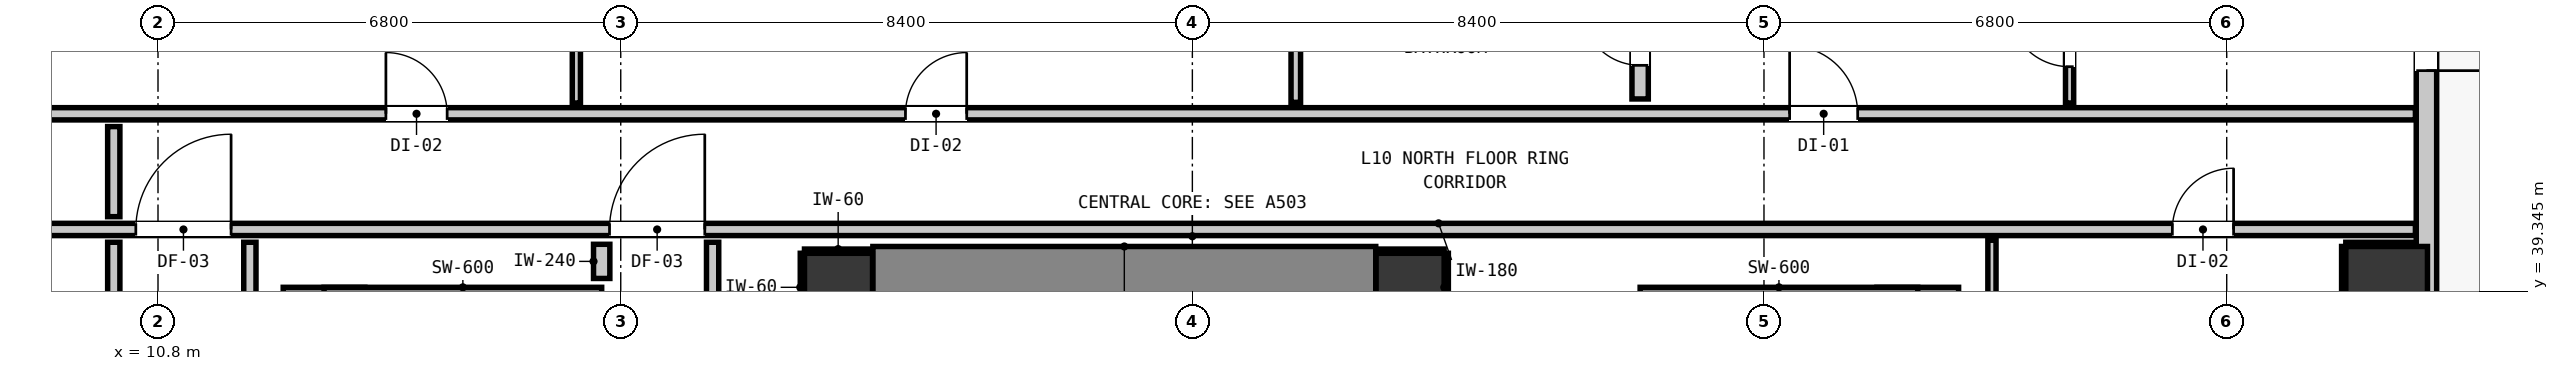
"""IFC4 building model, lengths in metres.
Left out: names, types, materials, properties, quantities, classifications, styles, units other than length and angle.
Written with IfcOpenShell. Run it as: python <this file> out.ifc"""

import sys

from ifc_helpers import new_model, si_unit, direction, frame, frame_2d, origin, origin_2d, place, context, subcontext, project, spatial, rectangle, extrude, element, fill, save


model = new_model("IFC4")
c1 = context("Model", 3, precision=1e-05, world=origin(), true_north=direction((0.0, 1.0)))
c2 = subcontext(c1, "Body", "Model", "MODEL_VIEW")
j1 = project(units=[si_unit("LENGTHUNIT", "METRE"), si_unit("PLANEANGLEUNIT", "RADIAN")], contexts=[c1])
p1 = place(None, origin())
s1 = spatial("IfcSite", under=j1, at=p1, CompositionType="ELEMENT")
p2 = place(p1, origin())
s2 = spatial("IfcBuilding", under=s1, at=p2, CompositionType="ELEMENT")
p3 = place(p2, frame((0.0, 0.0, 38.6)))
s3 = spatial("IfcBuildingStorey", under=s2, at=p3, CompositionType="ELEMENT", Elevation=38.6)
for number, where, z_axis, x_axis in (
    (1, (20.8, 39.4, 0.0), (0.0, 0.0, 1.0), (1.0, 0.0, 0.0)),
    (2, (29.2, 39.4, 0.0), (0.0, 0.0, 1.0), (1.0, 0.0, 0.0)),
):
    element("IfcColumn", number, at=place(p3, frame(where, z_axis=z_axis, x_axis=x_axis)), inside=s3, PredefinedType="COLUMN", context=c2, shape_type="SweptSolid", body=[
        extrude(rectangle(XDim=1.0, YDim=1.0, at=origin_2d()), origin(), (0.0, 0.0, 1.0), 3.32),
    ])
p4 = place(p3, frame((13.24, 31.205, 0.0), z_axis=(0.0, 0.0, 1.0), x_axis=(0.0, 1.0, 0.0)))
e3 = element("IfcWall", 3, at=p4, inside=s3, PredefinedType="SHEAR", context=c2, shape_type="SweptSolid", body=[
    extrude(rectangle(XDim=8.195, YDim=1.2, at=frame_2d((4.097, 0.0))), origin(), (0.0, 0.0, 1.0), 3.32),
])
p5 = place(p3, frame((13.24, 39.1, 0.0), z_axis=(0.0, 0.0, 1.0), x_axis=(1.0, 0.0, 0.0)))
e4 = element("IfcWall", 4, at=p5, inside=s3, PredefinedType="SHEAR", context=c2, shape_type="SweptSolid", body=[
    extrude(rectangle(XDim=4.08, YDim=0.6, at=frame_2d((2.04, 0.0))), origin(), (0.0, 0.0, 1.0), 3.32),
])
p6 = place(p3, frame((36.66, 31.205, 0.0), z_axis=(0.0, 0.0, 1.0), x_axis=(0.0, 1.0, 0.0)))
e5 = element("IfcWall", 5, at=p6, inside=s3, PredefinedType="SHEAR", context=c2, shape_type="SweptSolid", body=[
    extrude(rectangle(XDim=8.195, YDim=1.2, at=frame_2d((4.097, 0.0))), origin(), (0.0, 0.0, 1.0), 3.32),
])
p7 = place(p3, frame((32.58, 39.1, 0.0), z_axis=(0.0, 0.0, 1.0), x_axis=(1.0, 0.0, 0.0)))
e6 = element("IfcWall", 6, at=p7, inside=s3, PredefinedType="SHEAR", context=c2, shape_type="SweptSolid", body=[
    extrude(rectangle(XDim=4.08, YDim=0.6, at=frame_2d((2.04, 0.0))), origin(), (0.0, 0.0, 1.0), 3.32),
])
p8 = place(p3, frame((21.305, 39.4, 0.0), z_axis=(0.0, 0.0, 1.0), x_axis=(1.0, 0.0, 0.0)))
e7 = element("IfcWall", 7, at=p8, inside=s3, PredefinedType="SHEAR", context=c2, shape_type="SweptSolid", body=[
    extrude(rectangle(XDim=7.39, YDim=1.2, at=frame_2d((3.695, 0.0))), origin(), (0.0, 0.0, 1.0), 3.32),
])
p9 = place(p3, frame((43.55, 39.4, 0.0), z_axis=(0.0, 0.0, 1.0), x_axis=(1.0, 0.0, 0.0)))
e8 = element("IfcColumn", 8, at=p9, inside=s3, PredefinedType="COLUMN", context=c2, shape_type="SweptSolid", body=[
    extrude(rectangle(XDim=1.2, YDim=1.2, at=origin_2d()), origin(), (0.0, 0.0, 1.0), 2.9),
])
p10 = place(p3, frame((44.135, 44.835, 0.0), z_axis=(0.0, 0.0, 1.0), x_axis=(0.0, -1.0, 0.0)))
e9 = element("IfcWall", 9, at=p10, inside=s3, PredefinedType="STANDARD", context=c2, shape_type="SweptSolid", body=[
    extrude(rectangle(XDim=34.67, YDim=0.3, at=frame_2d((17.335, 0.0))), origin(), (0.0, 0.0, 1.0), 2.9),
])
p11 = place(p10, frame((1.251, 0.0, 0.0)))
e10 = element("IfcOpeningElement", 10, at=p11, cuts=e9, PredefinedType="OPENING", context=c2, shape_type="SweptSolid", body=[
    extrude(rectangle(XDim=1.0, YDim=2.15, at=frame_2d((0.5, 1.075))), frame((0.0, 0.16, 0.0), z_axis=(0.0, -1.0, 0.0), x_axis=(1.0, 0.0, 0.0)), (0.0, 0.0, 1.0), 0.32),
])
p12 = place(p10, frame((29.508, 0.0, 0.85)))
e11 = element("IfcOpeningElement", 11, at=p12, cuts=e9, PredefinedType="OPENING", context=c2, shape_type="SweptSolid", body=[
    extrude(rectangle(XDim=1.05, YDim=1.65, at=frame_2d((0.525, 0.825))), frame((0.0, 0.16, 0.0), z_axis=(0.0, -1.0, 0.0), x_axis=(1.0, 0.0, 0.0)), (0.0, 0.0, 1.0), 0.32),
])
p13 = place(p10, frame((19.619, 0.0, 0.85)))
e12 = element("IfcOpeningElement", 12, at=p13, cuts=e9, PredefinedType="OPENING", context=c2, shape_type="SweptSolid", body=[
    extrude(rectangle(XDim=1.05, YDim=1.65, at=frame_2d((0.525, 0.825))), frame((0.0, 0.16, 0.0), z_axis=(0.0, -1.0, 0.0), x_axis=(1.0, 0.0, 0.0)), (0.0, 0.0, 1.0), 0.32),
])
p14 = place(p3, frame((1.827, 40.25, 0.0), z_axis=(0.0, 0.0, 1.0), x_axis=(1.0, 0.0, 0.0)))
e13 = element("IfcWall", 13, at=p14, inside=s3, PredefinedType="PARTITIONING", context=c2, shape_type="SweptSolid", body=[
    extrude(rectangle(XDim=42.146, YDim=0.18, at=frame_2d((21.073, 0.0))), origin(), (0.0, 0.0, 1.0), 2.9),
])
p15 = place(p14, frame((15.608, 0.0, 0.0)))
e14 = element("IfcOpeningElement", 14, at=p15, cuts=e13, PredefinedType="OPENING", context=c2, shape_type="SweptSolid", body=[
    extrude(rectangle(XDim=1.4, YDim=2.15, at=frame_2d((0.7, 1.075))), frame((0.0, 0.1, 0.0), z_axis=(0.0, -1.0, 0.0), x_axis=(1.0, 0.0, 0.0)), (0.0, 0.0, 1.0), 0.2),
])
p16 = place(p14, frame((8.647, 0.0, 0.0)))
e15 = element("IfcOpeningElement", 15, at=p16, cuts=e13, PredefinedType="OPENING", context=c2, shape_type="SweptSolid", body=[
    extrude(rectangle(XDim=1.4, YDim=2.15, at=frame_2d((0.7, 1.075))), frame((0.0, 0.1, 0.0), z_axis=(0.0, -1.0, 0.0), x_axis=(1.0, 0.0, 0.0)), (0.0, 0.0, 1.0), 0.2),
])
p17 = place(p14, frame((38.574, 0.0, 0.0)))
e16 = element("IfcOpeningElement", 16, at=p17, cuts=e13, PredefinedType="OPENING", context=c2, shape_type="SweptSolid", body=[
    extrude(rectangle(XDim=0.9, YDim=2.1, at=frame_2d((0.45, 1.05))), frame((0.0, 0.1, 0.0), z_axis=(0.0, -1.0, 0.0), x_axis=(1.0, 0.0, 0.0)), (0.0, 0.0, 1.0), 0.2),
])
p18 = place(p3, frame((1.827, 41.95, 0.0), z_axis=(0.0, 0.0, 1.0), x_axis=(1.0, 0.0, 0.0)))
e17 = element("IfcWall", 17, at=p18, inside=s3, PredefinedType="PARTITIONING", context=c2, shape_type="SweptSolid", body=[
    extrude(rectangle(XDim=42.146, YDim=0.18, at=frame_2d((21.073, 0.0))), origin(), (0.0, 0.0, 1.0), 2.9),
])
p19 = place(p18, frame((12.322, 0.0, 0.0)))
e18 = element("IfcOpeningElement", 18, at=p19, cuts=e17, PredefinedType="OPENING", context=c2, shape_type="SweptSolid", body=[
    extrude(rectangle(XDim=0.9, YDim=2.1, at=frame_2d((0.45, 1.05))), frame((0.0, 0.1, 0.0), z_axis=(0.0, -1.0, 0.0), x_axis=(1.0, 0.0, 0.0)), (0.0, 0.0, 1.0), 0.2),
])
p20 = place(p18, frame((19.957, 0.0, 0.0)))
e19 = element("IfcOpeningElement", 19, at=p20, cuts=e17, PredefinedType="OPENING", context=c2, shape_type="SweptSolid", body=[
    extrude(rectangle(XDim=0.9, YDim=2.1, at=frame_2d((0.45, 1.05))), frame((0.0, 0.1, 0.0), z_axis=(0.0, -1.0, 0.0), x_axis=(1.0, 0.0, 0.0)), (0.0, 0.0, 1.0), 0.2),
])
p21 = place(p18, frame((32.95, 0.0, 0.0)))
e20 = element("IfcOpeningElement", 20, at=p21, cuts=e17, PredefinedType="OPENING", context=c2, shape_type="SweptSolid", body=[
    extrude(rectangle(XDim=1.0, YDim=2.15, at=frame_2d((0.5, 1.075))), frame((0.0, 0.1, 0.0), z_axis=(0.0, -1.0, 0.0), x_axis=(1.0, 0.0, 0.0)), (0.0, 0.0, 1.0), 0.2),
])
p22 = place(p3, frame((17.32, 39.53, 0.0), z_axis=(0.0, 0.0, 1.0), x_axis=(0.0, 1.0, 0.0)))
e21 = element("IfcWall", 21, at=p22, inside=s3, PredefinedType="PARTITIONING", context=c2, shape_type="SweptSolid", body=[
    extrude(rectangle(XDim=0.502, YDim=0.24, at=frame_2d((0.251, 0.0))), origin(), (0.0, 0.0, 1.0), 2.9),
])
p23 = place(p3, frame((32.58, 42.168, 0.0), z_axis=(0.0, 0.0, 1.0), x_axis=(0.0, 1.0, 0.0)))
e22 = element("IfcWall", 22, at=p23, inside=s3, PredefinedType="PARTITIONING", context=c2, shape_type="SweptSolid", body=[
    extrude(rectangle(XDim=1.916, YDim=0.24, at=frame_2d((0.958, 0.0))), origin(), (0.0, 0.0, 1.0), 2.9),
])
p24 = place(p23, frame((0.494, 0.0, 0.0)))
e23 = element("IfcOpeningElement", 23, at=p24, cuts=e22, PredefinedType="OPENING", context=c2, shape_type="SweptSolid", body=[
    extrude(rectangle(XDim=0.86, YDim=2.02, at=frame_2d((0.43, 1.01))), frame((0.0, 0.13, 0.0), z_axis=(0.0, -1.0, 0.0), x_axis=(1.0, 0.0, 0.0)), (0.0, 0.0, 1.0), 0.26),
])
p25 = place(p3, frame((10.15, 36.818, 0.0), z_axis=(0.0, 0.0, 1.0), x_axis=(0.0, 1.0, 0.0)))
e24 = element("IfcWall", 24, at=p25, inside=s3, PredefinedType="PARTITIONING", context=c2, shape_type="SweptSolid", body=[
    extrude(rectangle(XDim=3.244, YDim=0.18, at=frame_2d((1.622, 0.0))), origin(), (0.0, 0.0, 1.0), 2.9),
])
p26 = place(p25, frame((0.893, 0.0, 0.0)))
e25 = element("IfcOpeningElement", 25, at=p26, cuts=e24, PredefinedType="OPENING", context=c2, shape_type="SweptSolid", body=[
    extrude(rectangle(XDim=0.95, YDim=2.1, at=frame_2d((0.475, 1.05))), frame((0.0, 0.1, 0.0), z_axis=(0.0, -1.0, 0.0), x_axis=(1.0, 0.0, 0.0)), (0.0, 0.0, 1.0), 0.2),
])
p27 = place(p3, frame((10.15, 40.438, 0.0), z_axis=(0.0, 0.0, 1.0), x_axis=(0.0, 1.0, 0.0)))
e26 = element("IfcWall", 26, at=p27, inside=s3, PredefinedType="PARTITIONING", context=c2, shape_type="SweptSolid", body=[
    extrude(rectangle(XDim=1.324, YDim=0.18, at=frame_2d((0.662, 0.0))), origin(), (0.0, 0.0, 1.0), 2.9),
])
p28 = place(p3, frame((12.15, 21.368, 0.0), z_axis=(0.0, 0.0, 1.0), x_axis=(0.0, 1.0, 0.0)))
e27 = element("IfcWall", 27, at=p28, inside=s3, PredefinedType="PARTITIONING", context=c2, shape_type="SweptSolid", body=[
    extrude(rectangle(XDim=18.694, YDim=0.18, at=frame_2d((9.347, 0.0))), origin(), (0.0, 0.0, 1.0), 2.9),
])
p29 = place(p3, frame((18.95, 38.918, 0.0), z_axis=(0.0, 0.0, 1.0), x_axis=(0.0, 1.0, 0.0)))
e28 = element("IfcWall", 28, at=p29, inside=s3, PredefinedType="PARTITIONING", context=c2, shape_type="SweptSolid", body=[
    extrude(rectangle(XDim=1.144, YDim=0.18, at=frame_2d((0.572, 0.0))), origin(), (0.0, 0.0, 1.0), 2.9),
])
p30 = place(p3, frame((27.52, 42.118, 0.0), z_axis=(0.0, 0.0, 1.0), x_axis=(0.0, 1.0, 0.0)))
e29 = element("IfcWall", 29, at=p30, inside=s3, PredefinedType="PARTITIONING", context=c2, shape_type="SweptSolid", body=[
    extrude(rectangle(XDim=1.942, YDim=0.14, at=frame_2d((0.971, 0.0))), origin(), (0.0, 0.0, 1.0), 2.9),
])
p31 = place(p3, frame((16.948, 42.108, 0.0), z_axis=(0.0, 0.0, 1.0), x_axis=(0.0, 1.0, 0.0)))
e30 = element("IfcWall", 30, at=p31, inside=s3, PredefinedType="PARTITIONING", context=c2, shape_type="SweptSolid", body=[
    extrude(rectangle(XDim=5.065, YDim=0.12, at=frame_2d((2.533, 0.0))), origin(), (0.0, 0.0, 1.0), 2.9),
])
p32 = place(p3, frame((37.75, 32.138, 0.0), z_axis=(0.0, 0.0, 1.0), x_axis=(0.0, 1.0, 0.0)))
e31 = element("IfcWall", 31, at=p32, inside=s3, PredefinedType="PARTITIONING", context=c2, shape_type="SweptSolid", body=[
    extrude(rectangle(XDim=7.954, YDim=0.12, at=frame_2d((3.977, 0.0))), origin(), (0.0, 0.0, 1.0), 2.9),
])
p33 = place(p3, frame((38.891, 42.108, 0.0), z_axis=(0.0, 0.0, 1.0), x_axis=(0.0, 1.0, 0.0)))
e32 = element("IfcWall", 32, at=p33, inside=s3, PredefinedType="PARTITIONING", context=c2, shape_type="SweptSolid", body=[
    extrude(rectangle(XDim=1.962, YDim=0.12, at=frame_2d((0.981, 0.0))), origin(), (0.0, 0.0, 1.0), 2.9),
])
p34 = place(p33, frame((0.534, 0.0, 0.0)))
e33 = element("IfcOpeningElement", 33, at=p34, cuts=e32, PredefinedType="OPENING", context=c2, shape_type="SweptSolid", body=[
    extrude(rectangle(XDim=0.9, YDim=2.1, at=frame_2d((0.45, 1.05))), frame((0.0, 0.07, 0.0), z_axis=(0.0, -1.0, 0.0), x_axis=(1.0, 0.0, 0.0)), (0.0, 0.0, 1.0), 0.14),
])
p35 = place(p3, frame((20.3, 39.932, 0.0), z_axis=(0.0, 0.0, 1.0), x_axis=(1.0, 0.0, 0.0)))
e34 = element("IfcWall", 34, at=p35, inside=s3, PredefinedType="PARTITIONING", context=c2, shape_type="SweptSolid", body=[
    extrude(rectangle(XDim=0.99, YDim=0.06, at=frame_2d((0.495, 0.0))), origin(), (0.0, 0.0, 1.0), 0.905),
])
p36 = place(p3, frame((20.268, 38.9, 0.0), z_axis=(0.0, 0.0, 1.0), x_axis=(0.0, 1.0, 0.0)))
e35 = element("IfcWall", 35, at=p36, inside=s3, PredefinedType="PARTITIONING", context=c2, shape_type="SweptSolid", body=[
    extrude(rectangle(XDim=1.0, YDim=0.06, at=frame_2d((0.5, 0.0))), origin(), (0.0, 0.0, 1.0), 0.905),
])
p37 = place(p3, frame((28.71, 39.932, 0.0), z_axis=(0.0, 0.0, 1.0), x_axis=(1.0, 0.0, 0.0)))
e36 = element("IfcWall", 36, at=p37, inside=s3, PredefinedType="PARTITIONING", context=c2, shape_type="SweptSolid", body=[
    extrude(rectangle(XDim=0.99, YDim=0.06, at=frame_2d((0.495, 0.0))), origin(), (0.0, 0.0, 1.0), 0.905),
])
p38 = place(p3, frame((29.732, 38.9, 0.0), z_axis=(0.0, 0.0, 1.0), x_axis=(0.0, 1.0, 0.0)))
e37 = element("IfcWall", 37, at=p38, inside=s3, PredefinedType="PARTITIONING", context=c2, shape_type="SweptSolid", body=[
    extrude(rectangle(XDim=1.0, YDim=0.06, at=frame_2d((0.5, 0.0))), origin(), (0.0, 0.0, 1.0), 0.905),
])
p39 = place(p3, frame((42.95, 40.032, 0.0), z_axis=(0.0, 0.0, 1.0), x_axis=(1.0, 0.0, 0.0)))
e38 = element("IfcWall", 38, at=p39, inside=s3, PredefinedType="PARTITIONING", context=c2, shape_type="SweptSolid", body=[
    extrude(rectangle(XDim=1.02, YDim=0.06, at=frame_2d((0.51, 0.0))), origin(), (0.0, 0.0, 1.0), 0.905),
])
p40 = place(p3, frame((42.918, 38.8, 0.0), z_axis=(0.0, 0.0, 1.0), x_axis=(0.0, 1.0, 0.0)))
e39 = element("IfcWall", 39, at=p40, inside=s3, PredefinedType="PARTITIONING", context=c2, shape_type="SweptSolid", body=[
    extrude(rectangle(XDim=1.2, YDim=0.06, at=frame_2d((0.6, 0.0))), origin(), (0.0, 0.0, 1.0), 1.45),
])
p41 = place(p11, origin())
e40 = element("IfcDoor", 40, at=p41, inside=s3, OperationType="SINGLE_SWING_RIGHT", PredefinedType="DOOR", context=c2, shape_type="SweptSolid", body=[
    extrude(rectangle(XDim=1.0, YDim=2.15, at=frame_2d((0.5, 1.075))), frame((0.0, 0.025, 0.0), z_axis=(0.0, -1.0, 0.0), x_axis=(1.0, 0.0, 0.0)), (0.0, 0.0, 1.0), 0.05),
])
fill(e10, e40)
p42 = place(p15, origin())
e41 = element("IfcDoor", 41, at=p42, inside=s3, OperationType="SINGLE_SWING_RIGHT", PredefinedType="DOOR", context=c2, shape_type="SweptSolid", body=[
    extrude(rectangle(XDim=1.4, YDim=2.15, at=frame_2d((0.7, 1.075))), frame((0.0, 0.025, 0.0), z_axis=(0.0, -1.0, 0.0), x_axis=(1.0, 0.0, 0.0)), (0.0, 0.0, 1.0), 0.05),
])
fill(e14, e41)
p43 = place(p16, origin())
e42 = element("IfcDoor", 42, at=p43, inside=s3, OperationType="SINGLE_SWING_RIGHT", PredefinedType="DOOR", context=c2, shape_type="SweptSolid", body=[
    extrude(rectangle(XDim=1.4, YDim=2.15, at=frame_2d((0.7, 1.075))), frame((0.0, 0.025, 0.0), z_axis=(0.0, -1.0, 0.0), x_axis=(1.0, 0.0, 0.0)), (0.0, 0.0, 1.0), 0.05),
])
fill(e15, e42)
p44 = place(p19, origin())
e43 = element("IfcDoor", 43, at=p44, inside=s3, OperationType="SINGLE_SWING_LEFT", PredefinedType="DOOR", context=c2, shape_type="SweptSolid", body=[
    extrude(rectangle(XDim=0.9, YDim=2.1, at=frame_2d((0.45, 1.05))), frame((0.0, 0.025, 0.0), z_axis=(0.0, -1.0, 0.0), x_axis=(1.0, 0.0, 0.0)), (0.0, 0.0, 1.0), 0.05),
])
fill(e18, e43)
p45 = place(p20, origin())
e44 = element("IfcDoor", 44, at=p45, inside=s3, OperationType="SINGLE_SWING_RIGHT", PredefinedType="DOOR", context=c2, shape_type="SweptSolid", body=[
    extrude(rectangle(XDim=0.9, YDim=2.1, at=frame_2d((0.45, 1.05))), frame((0.0, 0.025, 0.0), z_axis=(0.0, -1.0, 0.0), x_axis=(1.0, 0.0, 0.0)), (0.0, 0.0, 1.0), 0.05),
])
fill(e19, e44)
p46 = place(p21, origin())
e45 = element("IfcDoor", 45, at=p46, inside=s3, OperationType="SINGLE_SWING_LEFT", PredefinedType="DOOR", context=c2, shape_type="SweptSolid", body=[
    extrude(rectangle(XDim=1.0, YDim=2.15, at=frame_2d((0.5, 1.075))), frame((0.0, 0.025, 0.0), z_axis=(0.0, -1.0, 0.0), x_axis=(1.0, 0.0, 0.0)), (0.0, 0.0, 1.0), 0.05),
])
fill(e20, e45)
p47 = place(p24, origin())
e46 = element("IfcDoor", 46, at=p47, inside=s3, OperationType="SINGLE_SWING_RIGHT", PredefinedType="DOOR", context=c2, shape_type="SweptSolid", body=[
    extrude(rectangle(XDim=0.86, YDim=2.02, at=frame_2d((0.43, 1.01))), frame((0.0, 0.025, 0.0), z_axis=(0.0, -1.0, 0.0), x_axis=(1.0, 0.0, 0.0)), (0.0, 0.0, 1.0), 0.05),
])
fill(e23, e46)
p48 = place(p34, origin())
e47 = element("IfcDoor", 47, at=p48, inside=s3, OperationType="SINGLE_SWING_RIGHT", PredefinedType="DOOR", context=c2, shape_type="SweptSolid", body=[
    extrude(rectangle(XDim=0.9, YDim=2.1, at=frame_2d((0.45, 1.05))), frame((0.0, 0.025, 0.0), z_axis=(0.0, -1.0, 0.0), x_axis=(1.0, 0.0, 0.0)), (0.0, 0.0, 1.0), 0.05),
])
fill(e33, e47)
p49 = place(p17, origin())
e48 = element("IfcDoor", 48, at=p49, inside=s3, OperationType="SINGLE_SWING_RIGHT", PredefinedType="DOOR", context=c2, shape_type="SweptSolid", body=[
    extrude(rectangle(XDim=0.9, YDim=2.1, at=frame_2d((0.45, 1.05))), frame((0.0, 0.025, 0.0), z_axis=(0.0, -1.0, 0.0), x_axis=(1.0, 0.0, 0.0)), (0.0, 0.0, 1.0), 0.05),
])
fill(e16, e48)
save(model, sys.argv[1])
